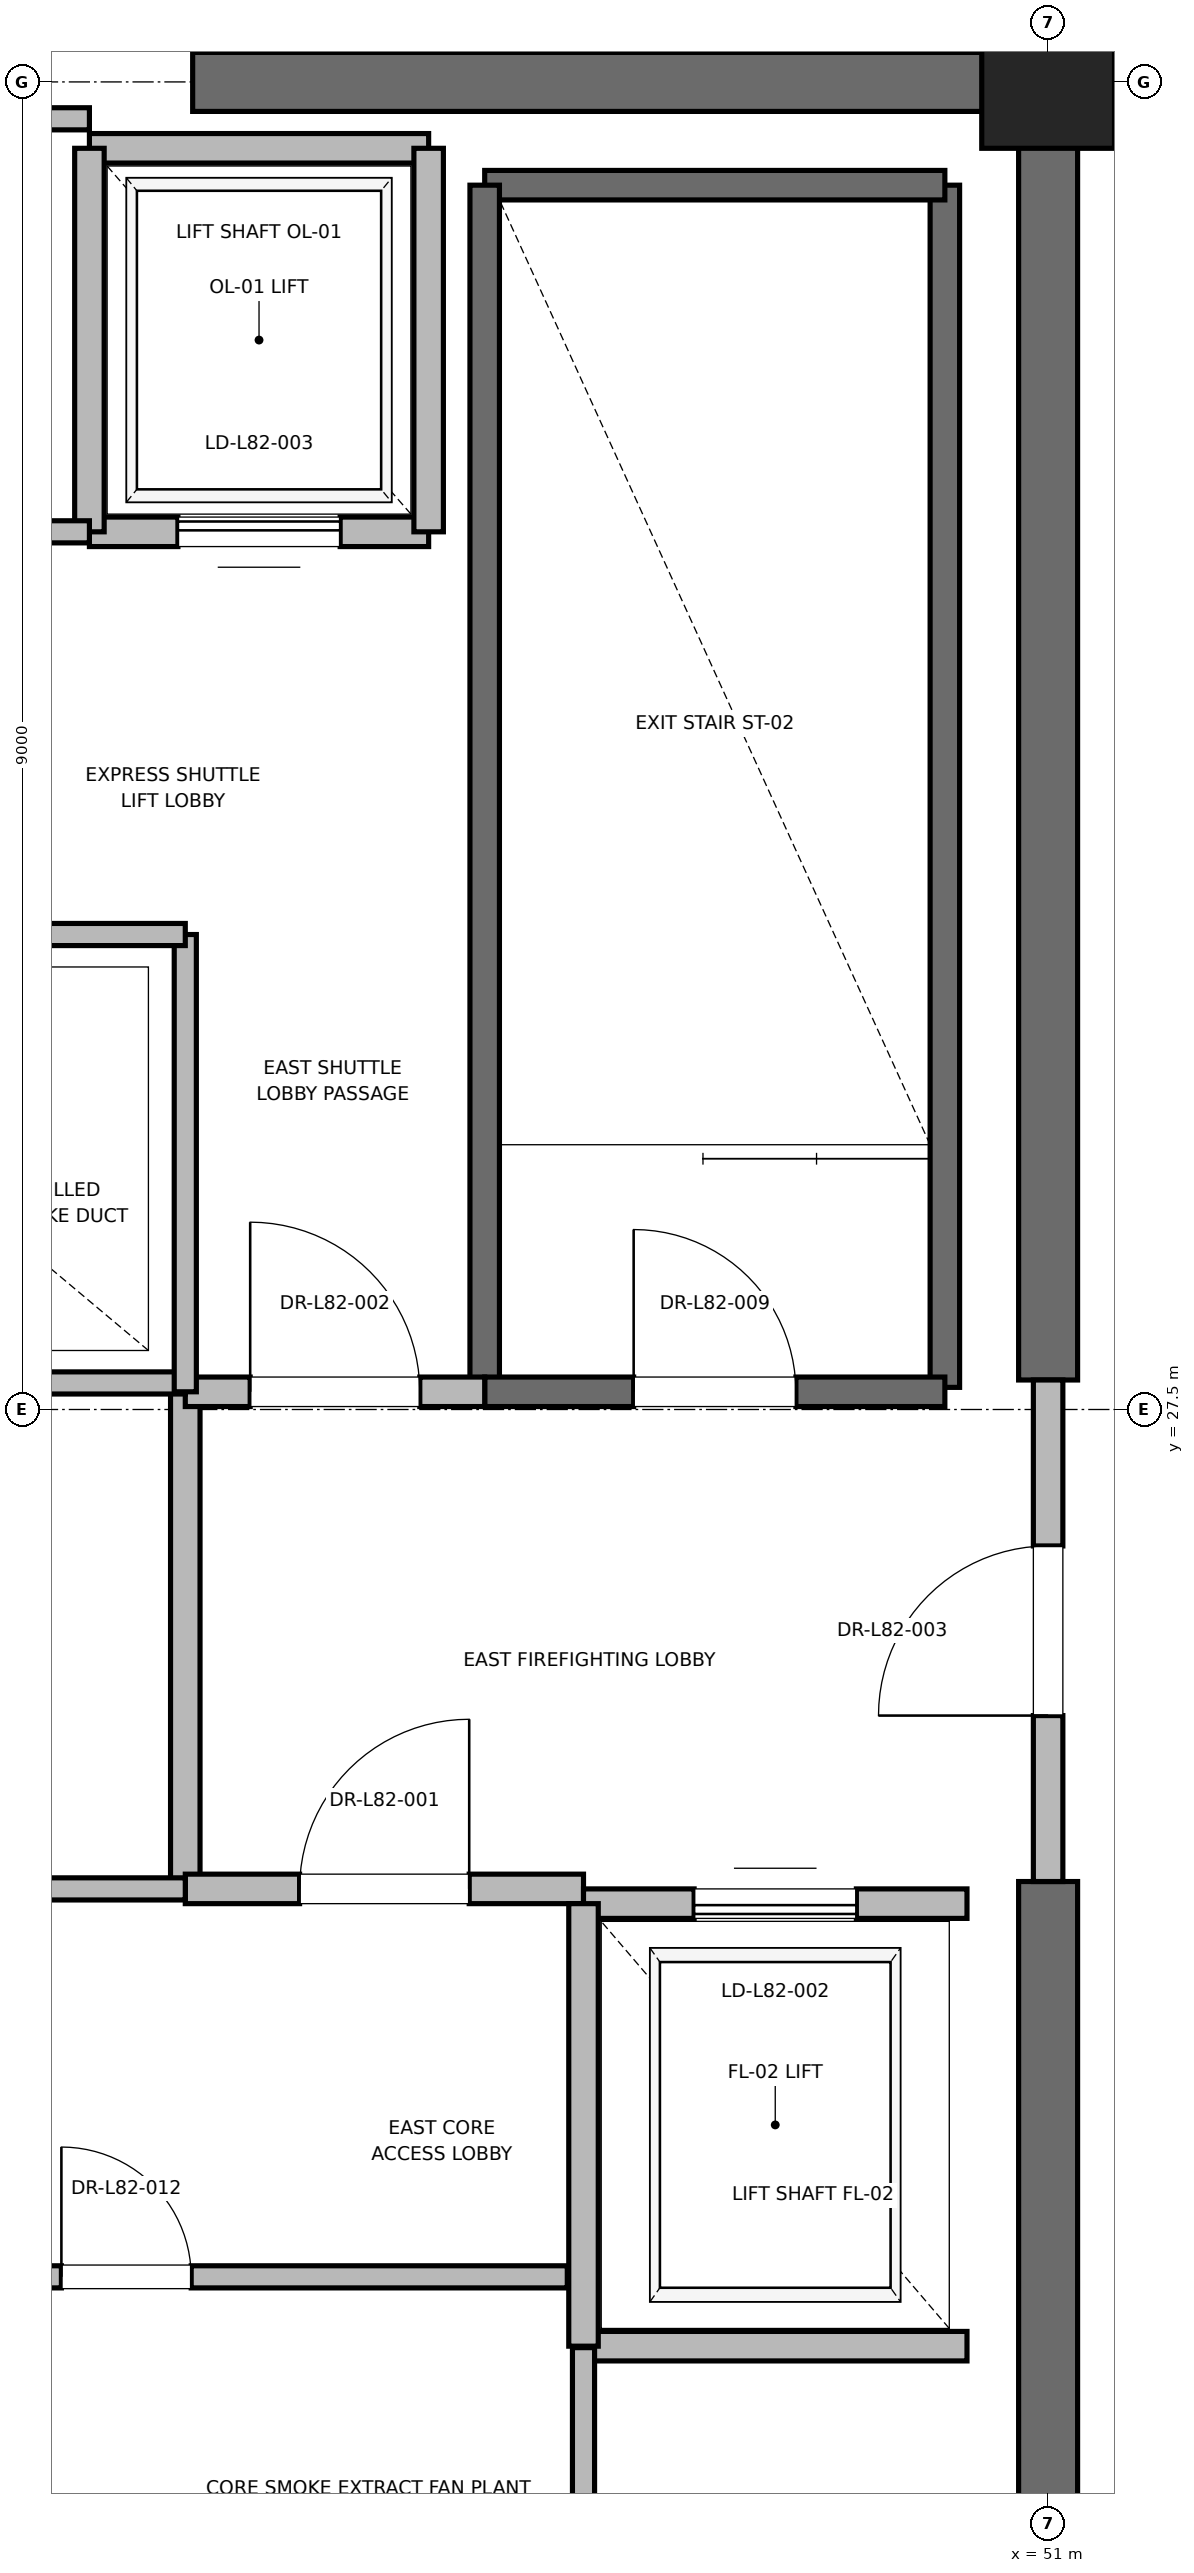
"""IFC4 building model, lengths in metres.
Left out: names, types, materials, properties, quantities, classifications, styles, units other than length and angle.
Written with IfcOpenShell. Run it as: python <this file> out.ifc"""

import sys

from ifc_helpers import new_model, si_unit, direction, frame, frame_2d, origin, origin_2d, place, context, subcontext, project, spatial, rectangle, extrude, element, fill, save


model = new_model("IFC4")
c1 = context("Model", 3, precision=1e-05, world=origin(), true_north=direction((0.0, 1.0)))
c2 = subcontext(c1, "Body", "Model", "MODEL_VIEW")
j1 = project(units=[si_unit("LENGTHUNIT", "METRE"), si_unit("PLANEANGLEUNIT", "RADIAN")], contexts=[c1])
p1 = place(None, origin())
s1 = spatial("IfcSite", under=j1, at=p1, CompositionType="ELEMENT")
p2 = place(p1, origin())
s2 = spatial("IfcBuilding", under=s1, at=p2, CompositionType="ELEMENT")
p3 = place(p2, frame((0.0, 0.0, 354.3)))
s3 = spatial("IfcBuildingStorey", under=s2, at=p3, CompositionType="ELEMENT", Elevation=354.3)
p4 = place(p3, frame((51.0, 36.5, 0.0), z_axis=(0.0, 0.0, 1.0), x_axis=(1.0, 0.0, 0.0)))
e1 = element("IfcColumn", 1, at=p4, inside=s3, PredefinedType="PILASTER", context=c2, shape_type="SweptSolid", body=[
    extrude(rectangle(XDim=0.9, YDim=0.9, at=origin_2d()), origin(), (0.0, 0.0, 1.0), 5.5),
])
for number, where, z_axis, x_axis in (
    (2, (45.2, 36.5, 0.0), (0.0, 0.0, 1.0), (1.0, 0.0, 0.0)),
    (3, (51.0, 18.5, 0.0), (0.0, 0.0, 1.0), (0.0, 1.0, 0.0)),
):
    element("IfcWall", number, at=place(p3, frame(where, z_axis=z_axis, x_axis=x_axis)), inside=s3, PredefinedType="SHEAR", context=c2, shape_type="SweptSolid", body=[
        extrude(rectangle(XDim=5.8, YDim=0.4, at=frame_2d((2.9, 0.0))), origin(), (0.0, 0.0, 1.0), 5.24),
    ])
p5 = place(p3, frame((51.0, 27.7, 0.0), z_axis=(0.0, 0.0, 1.0), x_axis=(0.0, 1.0, 0.0)))
e4 = element("IfcWall", 4, at=p5, inside=s3, PredefinedType="SHEAR", context=c2, shape_type="SweptSolid", body=[
    extrude(rectangle(XDim=8.8, YDim=0.4, at=frame_2d((4.4, 0.0))), origin(), (0.0, 0.0, 1.0), 5.24),
])
p6 = place(p3, frame((50.3, 27.65, 0.0), z_axis=(0.0, 0.0, 1.0), x_axis=(0.0, 1.0, 0.0)))
e5 = element("IfcWall", 5, at=p6, inside=s3, PredefinedType="SOLIDWALL", context=c2, shape_type="SweptSolid", body=[
    extrude(rectangle(XDim=8.15, YDim=0.2, at=frame_2d((4.075, 0.0))), origin(), (0.0, 0.0, 1.0), 5.24),
])
p7 = place(p3, frame((47.18, 35.8, 0.0), z_axis=(0.0, 0.0, 1.0), x_axis=(1.0, 0.0, 0.0)))
e6 = element("IfcWall", 6, at=p7, inside=s3, PredefinedType="SOLIDWALL", context=c2, shape_type="SweptSolid", body=[
    extrude(rectangle(XDim=3.12, YDim=0.2, at=frame_2d((1.56, 0.0))), origin(), (0.0, 0.0, 1.0), 5.24),
])
p8 = place(p3, frame((47.18, 27.62, 0.0), z_axis=(0.0, 0.0, 1.0), x_axis=(0.0, 1.0, 0.0)))
e7 = element("IfcWall", 7, at=p8, inside=s3, PredefinedType="SOLIDWALL", context=c2, shape_type="SweptSolid", body=[
    extrude(rectangle(XDim=8.18, YDim=0.2, at=frame_2d((4.09, 0.0))), origin(), (0.0, 0.0, 1.0), 5.24),
])
p9 = place(p3, frame((47.18, 27.62, 0.0), z_axis=(0.0, 0.0, 1.0), x_axis=(1.0, 0.0, 0.0)))
e8 = element("IfcWall", 8, at=p9, inside=s3, PredefinedType="SOLIDWALL", context=c2, shape_type="SweptSolid", body=[
    extrude(rectangle(XDim=3.12, YDim=0.2, at=frame_2d((1.56, 0.0))), origin(), (0.0, 0.0, 1.0), 5.24),
])
p10 = place(p9, frame((1.01, 0.0, 0.0)))
e9 = element("IfcOpeningElement", 9, at=p10, cuts=e8, PredefinedType="OPENING", context=c2, shape_type="SweptSolid", body=[
    extrude(rectangle(XDim=1.1, YDim=2.15, at=frame_2d((0.55, 1.075))), frame((0.0, 0.1, 0.0), z_axis=(0.0, -1.0, 0.0), x_axis=(1.0, 0.0, 0.0)), (0.0, 0.0, 1.0), 0.2),
])
p11 = place(p3, frame((45.15, 24.25, 0.0), z_axis=(0.0, 0.0, 1.0), x_axis=(0.0, 1.0, 0.0)))
e10 = element("IfcWall", 10, at=p11, inside=s3, PredefinedType="PARTITIONING", context=c2, shape_type="SweptSolid", body=[
    extrude(rectangle(XDim=3.37, YDim=0.2, at=frame_2d((1.685, 0.0))), origin(), (0.0, 0.0, 1.0), 5.24),
])
p12 = place(p3, frame((45.15, 24.25, 0.0), z_axis=(0.0, 0.0, 1.0), x_axis=(1.0, 0.0, 0.0)))
e11 = element("IfcWall", 11, at=p12, inside=s3, PredefinedType="PARTITIONING", context=c2, shape_type="SweptSolid", body=[
    extrude(rectangle(XDim=2.7, YDim=0.2, at=frame_2d((1.35, 0.0))), origin(), (0.0, 0.0, 1.0), 5.24),
])
p13 = place(p12, frame((0.775, 0.0, 0.0)))
e12 = element("IfcOpeningElement", 12, at=p13, cuts=e11, PredefinedType="OPENING", context=c2, shape_type="SweptSolid", body=[
    extrude(rectangle(XDim=1.15, YDim=2.2, at=frame_2d((0.575, 1.1))), frame((0.0, 0.1, 0.0), z_axis=(0.0, -1.0, 0.0), x_axis=(1.0, 0.0, 0.0)), (0.0, 0.0, 1.0), 0.2),
])
p14 = place(p3, frame((45.15, 27.62, 0.0), z_axis=(0.0, 0.0, 1.0), x_axis=(1.0, 0.0, 0.0)))
e13 = element("IfcWall", 13, at=p14, inside=s3, PredefinedType="PARTITIONING", context=c2, shape_type="SweptSolid", body=[
    extrude(rectangle(XDim=2.03, YDim=0.2, at=frame_2d((1.015, 0.0))), origin(), (0.0, 0.0, 1.0), 5.24),
])
p15 = place(p14, frame((0.44, 0.0, 0.0)))
e14 = element("IfcOpeningElement", 14, at=p15, cuts=e13, PredefinedType="OPENING", context=c2, shape_type="SweptSolid", body=[
    extrude(rectangle(XDim=1.15, YDim=2.2, at=frame_2d((0.575, 1.1))), frame((0.0, 0.1, 0.0), z_axis=(0.0, -1.0, 0.0), x_axis=(1.0, 0.0, 0.0)), (0.0, 0.0, 1.0), 0.2),
])
p16 = place(p3, frame((51.0, 24.3, 0.0), z_axis=(0.0, 0.0, 1.0), x_axis=(0.0, 1.0, 0.0)))
e15 = element("IfcWall", 15, at=p16, inside=s3, PredefinedType="PARTITIONING", context=c2, shape_type="SweptSolid", body=[
    extrude(rectangle(XDim=3.4, YDim=0.2, at=frame_2d((1.7, 0.0))), origin(), (0.0, 0.0, 1.0), 4.32),
])
p17 = place(p16, frame((1.125, 0.0, 0.0)))
e16 = element("IfcOpeningElement", 16, at=p17, cuts=e15, PredefinedType="OPENING", context=c2, shape_type="SweptSolid", body=[
    extrude(rectangle(XDim=1.15, YDim=2.2, at=frame_2d((0.575, 1.1))), frame((0.0, 0.1, 0.0), z_axis=(0.0, -1.0, 0.0), x_axis=(1.0, 0.0, 0.0)), (0.0, 0.0, 1.0), 0.2),
])
p18 = place(p3, frame((47.85, 21.15, 0.0), z_axis=(0.0, 0.0, 1.0), x_axis=(1.0, 0.0, 0.0)))
e17 = element("IfcWall", 17, at=p18, inside=s3, PredefinedType="SOLIDWALL", context=c2, shape_type="SweptSolid", body=[
    extrude(rectangle(XDim=2.6, YDim=0.2, at=frame_2d((1.3, 0.0))), origin(), (0.0, 0.0, 1.0), 5.24),
])
p19 = place(p3, frame((50.45, 24.15, 0.0), z_axis=(0.0, 0.0, 1.0), x_axis=(-1.0, 0.0, 0.0)))
e18 = element("IfcWall", 18, at=p19, inside=s3, PredefinedType="SOLIDWALL", context=c2, shape_type="SweptSolid", body=[
    extrude(rectangle(XDim=2.6, YDim=0.2, at=frame_2d((1.3, 0.0))), origin(), (0.0, 0.0, 1.0), 4.32),
])
p20 = place(p19, frame((0.75, 0.0, 0.0)))
e19 = element("IfcOpeningElement", 19, at=p20, cuts=e18, PredefinedType="OPENING", context=c2, shape_type="SweptSolid", body=[
    extrude(rectangle(XDim=1.1, YDim=2.2, at=frame_2d((0.55, 1.1))), frame((0.0, 0.1, 0.0), z_axis=(0.0, -1.0, 0.0), x_axis=(1.0, 0.0, 0.0)), (0.0, 0.0, 1.0), 0.2),
])
p21 = place(p3, frame((47.85, 24.15, 0.0), z_axis=(0.0, 0.0, 1.0), x_axis=(0.0, -1.0, 0.0)))
e20 = element("IfcWall", 20, at=p21, inside=s3, PredefinedType="SOLIDWALL", context=c2, shape_type="SweptSolid", body=[
    extrude(rectangle(XDim=3.0, YDim=0.2, at=frame_2d((1.5, 0.0))), origin(), (0.0, 0.0, 1.0), 5.24),
])
p22 = place(p3, frame((44.5, 33.45, 0.0), z_axis=(0.0, 0.0, 1.0), x_axis=(1.0, 0.0, 0.0)))
e21 = element("IfcWall", 21, at=p22, inside=s3, PredefinedType="SOLIDWALL", context=c2, shape_type="SweptSolid", body=[
    extrude(rectangle(XDim=2.3, YDim=0.2, at=frame_2d((1.15, 0.0))), origin(), (0.0, 0.0, 1.0), 5.24),
])
p23 = place(p22, frame((0.6, 0.0, 0.0)))
e22 = element("IfcOpeningElement", 22, at=p23, cuts=e21, PredefinedType="OPENING", context=c2, shape_type="SweptSolid", body=[
    extrude(rectangle(XDim=1.1, YDim=2.2, at=frame_2d((0.55, 1.1))), frame((0.0, 0.1, 0.0), z_axis=(0.0, -1.0, 0.0), x_axis=(1.0, 0.0, 0.0)), (0.0, 0.0, 1.0), 0.2),
])
p24 = place(p3, frame((46.8, 36.05, 0.0), z_axis=(0.0, 0.0, 1.0), x_axis=(-1.0, 0.0, 0.0)))
e23 = element("IfcWall", 23, at=p24, inside=s3, PredefinedType="SOLIDWALL", context=c2, shape_type="SweptSolid", body=[
    extrude(rectangle(XDim=2.3, YDim=0.2, at=frame_2d((1.15, 0.0))), origin(), (0.0, 0.0, 1.0), 4.32),
])
p25 = place(p3, frame((44.5, 36.05, 0.0), z_axis=(0.0, 0.0, 1.0), x_axis=(0.0, -1.0, 0.0)))
e24 = element("IfcWall", 24, at=p25, inside=s3, PredefinedType="SOLIDWALL", context=c2, shape_type="SweptSolid", body=[
    extrude(rectangle(XDim=2.6, YDim=0.2, at=frame_2d((1.3, 0.0))), origin(), (0.0, 0.0, 1.0), 4.32),
])
p26 = place(p3, frame((46.8, 33.45, 0.0), z_axis=(0.0, 0.0, 1.0), x_axis=(0.0, 1.0, 0.0)))
e25 = element("IfcWall", 25, at=p26, inside=s3, PredefinedType="SOLIDWALL", context=c2, shape_type="SweptSolid", body=[
    extrude(rectangle(XDim=2.6, YDim=0.2, at=frame_2d((1.3, 0.0))), origin(), (0.0, 0.0, 1.0), 5.24),
])
p27 = place(p3, frame((41.56, 27.68, 0.0), z_axis=(0.0, 0.0, 1.0), x_axis=(1.0, 0.0, 0.0)))
e26 = element("IfcWall", 26, at=p27, inside=s3, PredefinedType="PARTITIONING", context=c2, shape_type="SweptSolid", body=[
    extrude(rectangle(XDim=3.59, YDim=0.15, at=frame_2d((1.795, 0.0))), origin(), (0.0, 0.0, 1.0), 2.85),
])
p28 = place(p3, frame((47.85, 18.6, 0.0), z_axis=(0.0, 0.0, 1.0), x_axis=(0.0, 1.0, 0.0)))
e27 = element("IfcWall", 27, at=p28, inside=s3, PredefinedType="PARTITIONING", context=c2, shape_type="SweptSolid", body=[
    extrude(rectangle(XDim=2.54, YDim=0.15, at=frame_2d((1.27, 0.0))), origin(), (0.0, 0.0, 1.0), 2.85),
])
p29 = place(p3, frame((41.76, 21.62, 0.0), z_axis=(0.0, 0.0, 1.0), x_axis=(1.0, 0.0, 0.0)))
e28 = element("IfcWall", 28, at=p29, inside=s3, PredefinedType="PARTITIONING", context=c2, shape_type="SweptSolid", body=[
    extrude(rectangle(XDim=5.98, YDim=0.15, at=frame_2d((2.99, 0.0))), origin(), (0.0, 0.0, 1.0), 2.85),
])
p30 = place(p29, frame((2.55, 0.0, 0.0)))
e29 = element("IfcOpeningElement", 29, at=p30, cuts=e28, PredefinedType="OPENING", context=c2, shape_type="SweptSolid", body=[
    extrude(rectangle(XDim=0.88, YDim=2.1, at=frame_2d((0.44, 1.05))), frame((0.0, 0.075, 0.0), z_axis=(0.0, -1.0, 0.0), x_axis=(1.0, 0.0, 0.0)), (0.0, 0.0, 1.0), 0.15),
])
p31 = place(p3, frame((41.76, 24.25, 0.0), z_axis=(0.0, 0.0, 1.0), x_axis=(1.0, 0.0, 0.0)))
e30 = element("IfcWall", 30, at=p31, inside=s3, PredefinedType="PARTITIONING", context=c2, shape_type="SweptSolid", body=[
    extrude(rectangle(XDim=3.39, YDim=0.15, at=frame_2d((1.695, 0.0))), origin(), (0.0, 0.0, 1.0), 2.85),
])
p32 = place(p31, frame((1.255, 0.0, 0.0)))
e31 = element("IfcOpeningElement", 31, at=p32, cuts=e30, PredefinedType="OPENING", context=c2, shape_type="SweptSolid", body=[
    extrude(rectangle(XDim=0.88, YDim=2.1, at=frame_2d((0.44, 1.05))), frame((0.0, 0.075, 0.0), z_axis=(0.0, -1.0, 0.0), x_axis=(1.0, 0.0, 0.0)), (0.0, 0.0, 1.0), 0.15),
])
p33 = place(p3, frame((45.15, 27.62, 0.0), z_axis=(0.0, 0.0, 1.0), x_axis=(0.0, 1.0, 0.0)))
e32 = element("IfcWall", 32, at=p33, inside=s3, PredefinedType="PARTITIONING", context=c2, shape_type="SweptSolid", body=[
    extrude(rectangle(XDim=3.1, YDim=0.15, at=frame_2d((1.55, 0.0))), origin(), (0.0, 0.0, 1.0), 2.85),
])
p34 = place(p3, frame((41.56, 30.72, 0.0), z_axis=(0.0, 0.0, 1.0), x_axis=(1.0, 0.0, 0.0)))
e33 = element("IfcWall", 33, at=p34, inside=s3, PredefinedType="PARTITIONING", context=c2, shape_type="SweptSolid", body=[
    extrude(rectangle(XDim=3.59, YDim=0.15, at=frame_2d((1.795, 0.0))), origin(), (0.0, 0.0, 1.0), 2.85),
])
p35 = place(p34, frame((1.355, 0.0, 0.0)))
e34 = element("IfcOpeningElement", 34, at=p35, cuts=e33, PredefinedType="OPENING", context=c2, shape_type="SweptSolid", body=[
    extrude(rectangle(XDim=0.88, YDim=2.1, at=frame_2d((0.44, 1.05))), frame((0.0, 0.075, 0.0), z_axis=(0.0, -1.0, 0.0), x_axis=(1.0, 0.0, 0.0)), (0.0, 0.0, 1.0), 0.15),
])
p36 = place(p3, frame((41.56, 36.25, 0.0), z_axis=(0.0, 0.0, 1.0), x_axis=(1.0, 0.0, 0.0)))
e35 = element("IfcWall", 35, at=p36, inside=s3, PredefinedType="PARTITIONING", context=c2, shape_type="SweptSolid", body=[
    extrude(rectangle(XDim=2.94, YDim=0.15, at=frame_2d((1.47, 0.0))), origin(), (0.0, 0.0, 1.0), 2.85),
])
p37 = place(p3, frame((41.56, 33.45, 0.0), z_axis=(0.0, 0.0, 1.0), x_axis=(1.0, 0.0, 0.0)))
e36 = element("IfcWall", 36, at=p37, inside=s3, PredefinedType="PARTITIONING", context=c2, shape_type="SweptSolid", body=[
    extrude(rectangle(XDim=2.94, YDim=0.15, at=frame_2d((1.47, 0.0))), origin(), (0.0, 0.0, 1.0), 2.85),
])
p38 = place(p37, frame((1.03, 0.0, 0.0)))
e37 = element("IfcOpeningElement", 37, at=p38, cuts=e36, PredefinedType="OPENING", context=c2, shape_type="SweptSolid", body=[
    extrude(rectangle(XDim=0.88, YDim=2.1, at=frame_2d((0.44, 1.05))), frame((0.0, 0.075, 0.0), z_axis=(0.0, -1.0, 0.0), x_axis=(1.0, 0.0, 0.0)), (0.0, 0.0, 1.0), 0.15),
])
p39 = place(p10, origin())
e38 = element("IfcDoor", 38, at=p39, inside=s3, OperationType="SINGLE_SWING_LEFT", PredefinedType="DOOR", context=c2, shape_type="SweptSolid", body=[
    extrude(rectangle(XDim=1.1, YDim=2.15, at=frame_2d((0.55, 1.075))), frame((0.0, 0.025, 0.0), z_axis=(0.0, -1.0, 0.0), x_axis=(1.0, 0.0, 0.0)), (0.0, 0.0, 1.0), 0.05),
])
fill(e9, e38)
p40 = place(p13, origin())
e39 = element("IfcDoor", 39, at=p40, inside=s3, OperationType="SINGLE_SWING_RIGHT", PredefinedType="DOOR", context=c2, shape_type="SweptSolid", body=[
    extrude(rectangle(XDim=1.15, YDim=2.2, at=frame_2d((0.575, 1.1))), frame((0.0, 0.025, 0.0), z_axis=(0.0, -1.0, 0.0), x_axis=(1.0, 0.0, 0.0)), (0.0, 0.0, 1.0), 0.05),
])
fill(e12, e39)
p41 = place(p15, origin())
e40 = element("IfcDoor", 40, at=p41, inside=s3, OperationType="SINGLE_SWING_LEFT", PredefinedType="DOOR", context=c2, shape_type="SweptSolid", body=[
    extrude(rectangle(XDim=1.15, YDim=2.2, at=frame_2d((0.575, 1.1))), frame((0.0, 0.025, 0.0), z_axis=(0.0, -1.0, 0.0), x_axis=(1.0, 0.0, 0.0)), (0.0, 0.0, 1.0), 0.05),
])
fill(e14, e40)
p42 = place(p17, origin())
e41 = element("IfcDoor", 41, at=p42, inside=s3, OperationType="SINGLE_SWING_LEFT", PredefinedType="DOOR", context=c2, shape_type="SweptSolid", body=[
    extrude(rectangle(XDim=1.15, YDim=2.2, at=frame_2d((0.575, 1.1))), frame((0.0, 0.025, 0.0), z_axis=(0.0, -1.0, 0.0), x_axis=(1.0, 0.0, 0.0)), (0.0, 0.0, 1.0), 0.05),
])
fill(e16, e41)
p43 = place(p20, origin())
e42 = element("IfcDoor", 42, at=p43, inside=s3, OperationType="SLIDING_TO_RIGHT", PredefinedType="DOOR", context=c2, shape_type="SweptSolid", body=[
    extrude(rectangle(XDim=1.1, YDim=2.2, at=frame_2d((0.55, 1.1))), frame((0.0, 0.025, 0.0), z_axis=(0.0, -1.0, 0.0), x_axis=(1.0, 0.0, 0.0)), (0.0, 0.0, 1.0), 0.05),
])
fill(e19, e42)
p44 = place(p23, origin())
e43 = element("IfcDoor", 43, at=p44, inside=s3, OperationType="SLIDING_TO_RIGHT", PredefinedType="DOOR", context=c2, shape_type="SweptSolid", body=[
    extrude(rectangle(XDim=1.1, YDim=2.2, at=frame_2d((0.55, 1.1))), frame((0.0, 0.025, 0.0), z_axis=(0.0, -1.0, 0.0), x_axis=(1.0, 0.0, 0.0)), (0.0, 0.0, 1.0), 0.05),
])
fill(e22, e43)
p45 = place(p30, origin())
e44 = element("IfcDoor", 44, at=p45, inside=s3, OperationType="SINGLE_SWING_LEFT", PredefinedType="DOOR", context=c2, shape_type="SweptSolid", body=[
    extrude(rectangle(XDim=0.88, YDim=2.1, at=frame_2d((0.44, 1.05))), frame((0.0, 0.025, 0.0), z_axis=(0.0, -1.0, 0.0), x_axis=(1.0, 0.0, 0.0)), (0.0, 0.0, 1.0), 0.05),
])
fill(e29, e44)
save(model, sys.argv[1])
